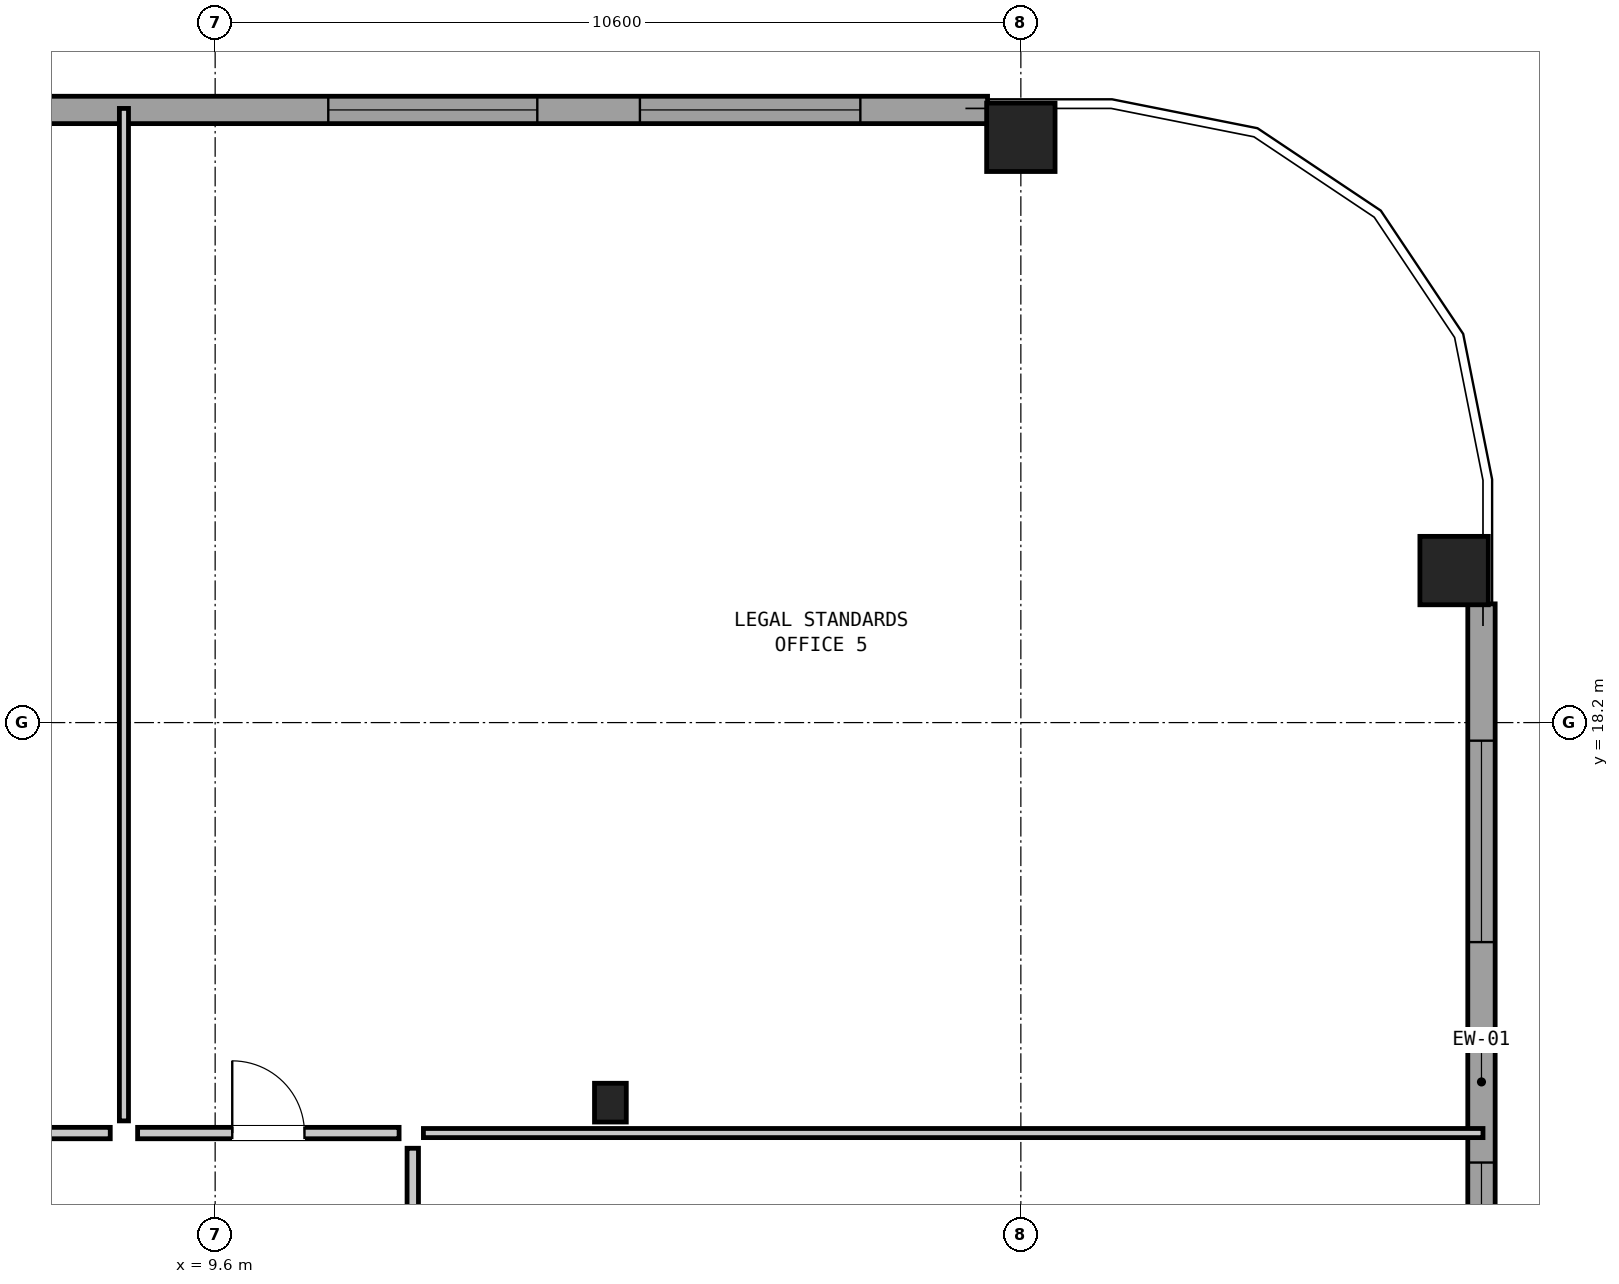
"""IFC4 building model, lengths in metres.
Left out: names, types, materials, properties, quantities, classifications, styles, units other than length and angle.
Written with IfcOpenShell. Run it as: python <this file> out.ifc"""

import sys

from ifc_helpers import new_model, si_unit, direction, frame, frame_2d, origin, origin_2d, place, context, subcontext, project, spatial, rectangle, hollow_rectangle, i_section, extrude, element, fill, save


model = new_model("IFC4")
c1 = context("Model", 3, precision=1e-05, world=origin(), true_north=direction((0.0, 1.0)))
c2 = subcontext(c1, "Body", "Model", "MODEL_VIEW")
j1 = project(units=[si_unit("LENGTHUNIT", "METRE"), si_unit("PLANEANGLEUNIT", "RADIAN")], contexts=[c1])
p1 = place(None, origin())
s1 = spatial("IfcSite", under=j1, at=p1, CompositionType="ELEMENT")
p2 = place(p1, origin())
s2 = spatial("IfcBuilding", under=s1, at=p2, CompositionType="ELEMENT")
p3 = place(p2, frame((0.0, 0.0, 35.25)))
s3 = spatial("IfcBuildingStorey", under=s2, at=p3, CompositionType="ELEMENT", Elevation=35.25)
for number, where, z_axis, x_axis in (
    (1, (25.9, 20.2, 0.0), (0.0, 0.0, 1.0), (0.0, 1.0, 0.0)),
    (2, (20.2, 25.9, 0.0), (0.0, 0.0, 1.0), (1.0, 0.0, 0.0)),
):
    element("IfcColumn", number, at=place(p3, frame(where, z_axis=z_axis, x_axis=x_axis)), inside=s3, PredefinedType="COLUMN", context=c2, shape_type="SweptSolid", body=[
        extrude(hollow_rectangle(XDim=0.9, YDim=0.9, WallThickness=0.055, at=origin_2d()), origin(), (0.0, 0.0, 1.0), 3.05),
    ])
p4 = place(p3, frame((14.8, 13.2, 0.0), z_axis=(0.0, 0.0, 1.0), x_axis=(1.0, 0.0, 0.0)))
e3 = element("IfcColumn", 3, at=p4, inside=s3, PredefinedType="COLUMN", context=c2, shape_type="SweptSolid", body=[
    extrude(i_section(OverallWidth=0.418, OverallDepth=0.51, WebThickness=0.042, FlangeThickness=0.068, at=origin_2d()), origin(), (0.0, 0.0, 1.0), 3.05),
])
p5 = place(p3, frame((26.26, 19.762, 0.0), z_axis=(0.0, 0.0, 1.0), x_axis=(0.0, -1.0, 0.0)))
e4 = element("IfcWall", 4, at=p5, inside=s3, PredefinedType="SOLIDWALL", context=c2, shape_type="SweptSolid", body=[
    extrude(rectangle(XDim=12.579, YDim=0.36, at=frame_2d((6.289, 0.0))), origin(), (0.0, 0.0, 1.0), 2.067),
])
p6 = place(p5, frame((1.8, 0.0, 0.2)))
e5 = element("IfcOpeningElement", 5, at=p6, cuts=e4, PredefinedType="OPENING", context=c2, shape_type="SweptSolid", body=[
    extrude(rectangle(XDim=2.65, YDim=1.05, at=frame_2d((1.325, 0.525))), frame((0.0, 0.192, 0.0), z_axis=(0.0, -1.0, 0.0), x_axis=(1.0, 0.0, 0.0)), (0.0, 0.0, 1.0), 0.384),
])
p7 = place(p5, frame((7.35, 0.0, 0.9)))
e6 = element("IfcOpeningElement", 6, at=p7, cuts=e4, PredefinedType="OPENING", context=c2, shape_type="SweptSolid", body=[
    extrude(rectangle(XDim=1.35, YDim=1.0, at=frame_2d((0.675, 0.5))), frame((0.0, 0.192, 0.0), z_axis=(0.0, -1.0, 0.0), x_axis=(1.0, 0.0, 0.0)), (0.0, 0.0, 1.0), 0.384),
])
p8 = place(p5, frame((10.35, 0.0, 0.2)))
e7 = element("IfcOpeningElement", 7, at=p8, cuts=e4, PredefinedType="OPENING", context=c2, shape_type="SweptSolid", body=[
    extrude(rectangle(XDim=2.15, YDim=1.2, at=frame_2d((1.075, 0.6))), frame((0.0, 0.192, 0.0), z_axis=(0.0, -1.0, 0.0), x_axis=(1.0, 0.0, 0.0)), (0.0, 0.0, 1.0), 0.384),
])
p9 = place(p3, frame((7.183, 26.26, 0.0), z_axis=(0.0, 0.0, 1.0), x_axis=(1.0, 0.0, 0.0)))
e8 = element("IfcWall", 8, at=p9, inside=s3, PredefinedType="SOLIDWALL", context=c2, shape_type="SweptSolid", body=[
    extrude(rectangle(XDim=12.579, YDim=0.36, at=frame_2d((6.289, 0.0))), origin(), (0.0, 0.0, 1.0), 2.067),
])
p10 = place(p9, frame((3.905, 0.0, 0.95)))
e9 = element("IfcOpeningElement", 9, at=p10, cuts=e8, PredefinedType="OPENING", context=c2, shape_type="SweptSolid", body=[
    extrude(rectangle(XDim=2.75, YDim=0.95, at=frame_2d((1.375, 0.475))), frame((0.0, 0.192, 0.0), z_axis=(0.0, -1.0, 0.0), x_axis=(1.0, 0.0, 0.0)), (0.0, 0.0, 1.0), 0.384),
])
p11 = place(p9, frame((8.005, 0.0, 0.2)))
e10 = element("IfcOpeningElement", 10, at=p11, cuts=e8, PredefinedType="OPENING", context=c2, shape_type="SweptSolid", body=[
    extrude(rectangle(XDim=2.9, YDim=0.9, at=frame_2d((1.45, 0.45))), frame((0.0, 0.192, 0.0), z_axis=(0.0, -1.0, 0.0), x_axis=(1.0, 0.0, 0.0)), (0.0, 0.0, 1.0), 0.384),
])
p12 = place(p3, frame((12.34, 12.8, 0.0), z_axis=(0.0, 0.0, 1.0), x_axis=(1.0, 0.0, 0.0)))
e11 = element("IfcWall", 11, at=p12, inside=s3, PredefinedType="PARTITIONING", context=c2, shape_type="SweptSolid", body=[
    extrude(rectangle(XDim=13.94, YDim=0.12, at=frame_2d((6.97, 0.0))), origin(), (0.0, 0.0, 1.0), 2.83),
])
p13 = place(p3, frame((8.4, 12.96, 0.0), z_axis=(0.0, 0.0, 1.0), x_axis=(0.0, 1.0, 0.0)))
e12 = element("IfcWall", 12, at=p13, inside=s3, PredefinedType="PARTITIONING", context=c2, shape_type="SweptSolid", body=[
    extrude(rectangle(XDim=13.32, YDim=0.12, at=frame_2d((6.66, 0.0))), origin(), (0.0, 0.0, 1.0), 2.83),
])
p14 = place(p3, frame((2.98, 12.8, 0.0), z_axis=(0.0, 0.0, 1.0), x_axis=(1.0, 0.0, 0.0)))
e13 = element("IfcWall", 13, at=p14, inside=s3, PredefinedType="PARTITIONING", context=c2, shape_type="SweptSolid", body=[
    extrude(rectangle(XDim=5.24, YDim=0.15, at=frame_2d((2.62, 0.0))), origin(), (0.0, 0.0, 1.0), 2.83),
])
p15 = place(p14, frame((2.145, 0.0, 0.0)))
e14 = element("IfcOpeningElement", 14, at=p15, cuts=e13, PredefinedType="OPENING", context=c2, shape_type="SweptSolid", body=[
    extrude(rectangle(XDim=0.95, YDim=2.1, at=frame_2d((0.475, 1.05))), frame((0.0, 0.087, 0.0), z_axis=(0.0, -1.0, 0.0), x_axis=(1.0, 0.0, 0.0)), (0.0, 0.0, 1.0), 0.174),
])
p16 = place(p3, frame((8.58, 12.8, 0.0), z_axis=(0.0, 0.0, 1.0), x_axis=(1.0, 0.0, 0.0)))
e15 = element("IfcWall", 15, at=p16, inside=s3, PredefinedType="PARTITIONING", context=c2, shape_type="SweptSolid", body=[
    extrude(rectangle(XDim=3.44, YDim=0.15, at=frame_2d((1.72, 0.0))), origin(), (0.0, 0.0, 1.0), 2.83),
])
p17 = place(p16, frame((1.245, 0.0, 0.0)))
e16 = element("IfcOpeningElement", 16, at=p17, cuts=e15, PredefinedType="OPENING", context=c2, shape_type="SweptSolid", body=[
    extrude(rectangle(XDim=0.95, YDim=2.1, at=frame_2d((0.475, 1.05))), frame((0.0, 0.087, 0.0), z_axis=(0.0, -1.0, 0.0), x_axis=(1.0, 0.0, 0.0)), (0.0, 0.0, 1.0), 0.174),
])
p18 = place(p3, frame((12.2, 3.8, 0.0), z_axis=(0.0, 0.0, 1.0), x_axis=(0.0, 1.0, 0.0)))
e17 = element("IfcWall", 17, at=p18, inside=s3, PredefinedType="PARTITIONING", context=c2, shape_type="SweptSolid", body=[
    extrude(rectangle(XDim=8.8, YDim=0.15, at=frame_2d((4.4, 0.0))), origin(), (0.0, 0.0, 1.0), 2.83),
])
p19 = place(p18, frame((3.925, 0.0, 0.0)))
e18 = element("IfcOpeningElement", 18, at=p19, cuts=e17, PredefinedType="OPENING", context=c2, shape_type="SweptSolid", body=[
    extrude(rectangle(XDim=0.95, YDim=2.1, at=frame_2d((0.475, 1.05))), frame((0.0, 0.087, 0.0), z_axis=(0.0, -1.0, 0.0), x_axis=(1.0, 0.0, 0.0)), (0.0, 0.0, 1.0), 0.174),
])
p20 = place(p6, origin())
e19 = element("IfcWindow", 19, at=p20, inside=s3, PartitioningType="SINGLE_PANEL", PredefinedType="WINDOW", context=c2, shape_type="SweptSolid", body=[
    extrude(rectangle(XDim=2.65, YDim=1.05, at=frame_2d((1.325, 0.525))), frame((0.0, 0.03, 0.0), z_axis=(0.0, -1.0, 0.0), x_axis=(1.0, 0.0, 0.0)), (0.0, 0.0, 1.0), 0.06),
])
fill(e5, e19)
p21 = place(p7, origin())
e20 = element("IfcWindow", 20, at=p21, inside=s3, PartitioningType="SINGLE_PANEL", PredefinedType="WINDOW", context=c2, shape_type="SweptSolid", body=[
    extrude(rectangle(XDim=1.35, YDim=1.0, at=frame_2d((0.675, 0.5))), frame((0.0, 0.03, 0.0), z_axis=(0.0, -1.0, 0.0), x_axis=(1.0, 0.0, 0.0)), (0.0, 0.0, 1.0), 0.06),
])
fill(e6, e20)
p22 = place(p10, origin())
e21 = element("IfcWindow", 21, at=p22, inside=s3, PartitioningType="SINGLE_PANEL", PredefinedType="WINDOW", context=c2, shape_type="SweptSolid", body=[
    extrude(rectangle(XDim=2.75, YDim=0.95, at=frame_2d((1.375, 0.475))), frame((0.0, 0.03, 0.0), z_axis=(0.0, -1.0, 0.0), x_axis=(1.0, 0.0, 0.0)), (0.0, 0.0, 1.0), 0.06),
])
fill(e9, e21)
p23 = place(p11, origin())
e22 = element("IfcWindow", 22, at=p23, inside=s3, PartitioningType="SINGLE_PANEL", PredefinedType="WINDOW", context=c2, shape_type="SweptSolid", body=[
    extrude(rectangle(XDim=2.9, YDim=0.9, at=frame_2d((1.45, 0.45))), frame((0.0, 0.03, 0.0), z_axis=(0.0, -1.0, 0.0), x_axis=(1.0, 0.0, 0.0)), (0.0, 0.0, 1.0), 0.06),
])
fill(e10, e22)
p24 = place(p17, origin())
e23 = element("IfcDoor", 23, at=p24, inside=s3, OperationType="SINGLE_SWING_LEFT", PredefinedType="DOOR", context=c2, shape_type="SweptSolid", body=[
    extrude(rectangle(XDim=0.95, YDim=2.1, at=frame_2d((0.475, 1.05))), frame((0.0, 0.025, 0.0), z_axis=(0.0, -1.0, 0.0), x_axis=(1.0, 0.0, 0.0)), (0.0, 0.0, 1.0), 0.05),
])
fill(e16, e23)
save(model, sys.argv[1])
